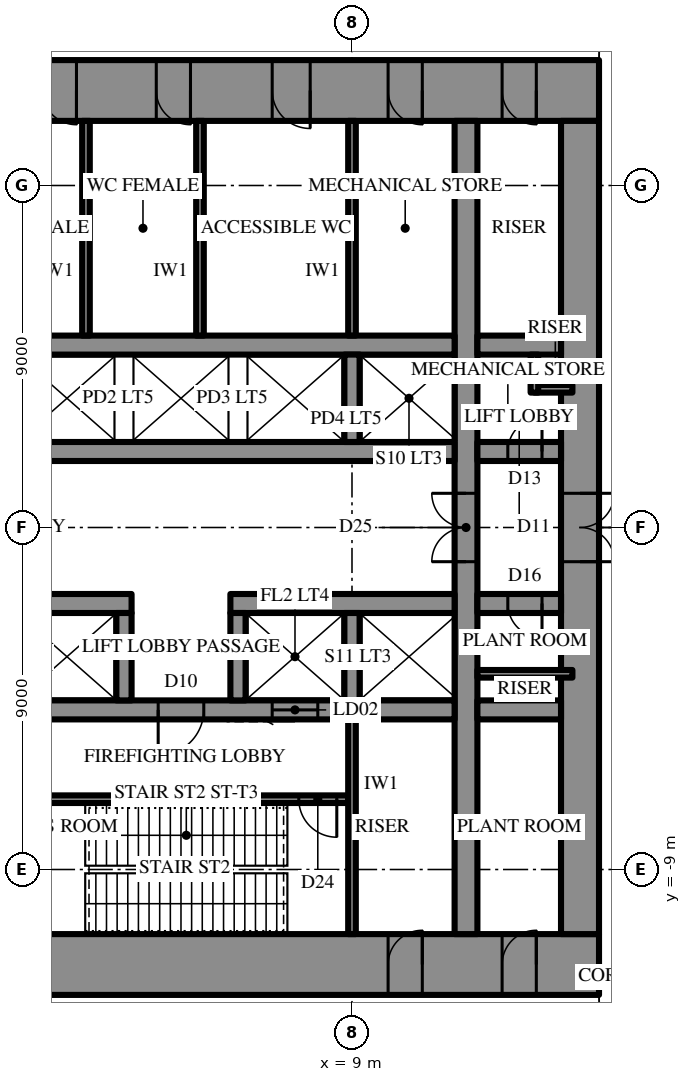
"""IFC4 building model, lengths in metres.
Left out: names, types, materials, properties, quantities, classifications, styles, units other than length and angle.
Written with IfcOpenShell. Run it as: python <this file> out.ifc"""

import sys

from ifc_helpers import new_model, si_unit, direction, frame, frame_2d, origin, place, context, subcontext, project, spatial, rectangle, extrude, element, fill, save


model = new_model("IFC4")
c1 = context("Model", 3, precision=1e-05, world=origin(), true_north=direction((0.0, 1.0)))
c2 = subcontext(c1, "Body", "Model", "MODEL_VIEW")
j1 = project(units=[si_unit("LENGTHUNIT", "METRE"), si_unit("PLANEANGLEUNIT", "RADIAN")], contexts=[c1])
p1 = place(None, origin())
s1 = spatial("IfcSite", under=j1, at=p1, CompositionType="ELEMENT")
p2 = place(p1, origin())
s2 = spatial("IfcBuilding", under=s1, at=p2, CompositionType="ELEMENT")
p3 = place(p2, frame((0.0, 0.0, 299.5)))
s3 = spatial("IfcBuildingStorey", under=s2, at=p3, CompositionType="ELEMENT", Elevation=299.5)
p4 = place(p3, frame((-15.5, 11.5, 0.0), z_axis=(0.0, 0.0, 1.0), x_axis=(1.0, 0.0, 0.0)))
e1 = element("IfcWall", 1, at=p4, inside=s3, PredefinedType="SHEAR", context=c2, shape_type="SweptSolid", body=[
    extrude(rectangle(XDim=31.0, YDim=1.6, at=frame_2d((15.5, 0.0))), origin(), (0.0, 0.0, 1.0), 7.0),
])
p5 = place(p4, frame((16.35, 0.0, 0.0)))
e2 = element("IfcOpeningElement", 2, at=p5, cuts=e1, PredefinedType="OPENING", context=c2, shape_type="SweptSolid", body=[
    extrude(rectangle(XDim=0.9, YDim=2.2, at=frame_2d((0.45, 1.1))), frame((0.0, 0.81, 0.0), z_axis=(0.0, -1.0, 0.0), x_axis=(1.0, 0.0, 0.0)), (0.0, 0.0, 1.0), 1.62),
])
p6 = place(p4, frame((19.35, 0.0, 0.0)))
e3 = element("IfcOpeningElement", 3, at=p6, cuts=e1, PredefinedType="OPENING", context=c2, shape_type="SweptSolid", body=[
    extrude(rectangle(XDim=0.9, YDim=2.2, at=frame_2d((0.45, 1.1))), frame((0.0, 0.81, 0.0), z_axis=(0.0, -1.0, 0.0), x_axis=(1.0, 0.0, 0.0)), (0.0, 0.0, 1.0), 1.62),
])
p7 = place(p4, frame((22.4, 0.0, 0.0)))
e4 = element("IfcOpeningElement", 4, at=p7, cuts=e1, PredefinedType="OPENING", context=c2, shape_type="SweptSolid", body=[
    extrude(rectangle(XDim=1.0, YDim=2.2, at=frame_2d((0.5, 1.1))), frame((0.0, 0.81, 0.0), z_axis=(0.0, -1.0, 0.0), x_axis=(1.0, 0.0, 0.0)), (0.0, 0.0, 1.0), 1.62),
])
p8 = place(p4, frame((1.65, 0.0, 0.0)))
e5 = element("IfcOpeningElement", 5, at=p8, cuts=e1, PredefinedType="OPENING", context=c2, shape_type="SweptSolid", body=[
    extrude(rectangle(XDim=0.9, YDim=2.2, at=frame_2d((0.45, 1.1))), frame((0.0, 0.81, 0.0), z_axis=(0.0, -1.0, 0.0), x_axis=(1.0, 0.0, 0.0)), (0.0, 0.0, 1.0), 1.62),
])
p9 = place(p4, frame((4.65, 0.0, 0.0)))
e6 = element("IfcOpeningElement", 6, at=p9, cuts=e1, PredefinedType="OPENING", context=c2, shape_type="SweptSolid", body=[
    extrude(rectangle(XDim=0.9, YDim=2.2, at=frame_2d((0.45, 1.1))), frame((0.0, 0.81, 0.0), z_axis=(0.0, -1.0, 0.0), x_axis=(1.0, 0.0, 0.0)), (0.0, 0.0, 1.0), 1.62),
])
p10 = place(p4, frame((25.45, 0.0, 0.0)))
e7 = element("IfcOpeningElement", 7, at=p10, cuts=e1, PredefinedType="OPENING", context=c2, shape_type="SweptSolid", body=[
    extrude(rectangle(XDim=0.9, YDim=2.2, at=frame_2d((0.45, 1.1))), frame((0.0, 0.81, 0.0), z_axis=(0.0, -1.0, 0.0), x_axis=(1.0, 0.0, 0.0)), (0.0, 0.0, 1.0), 1.62),
])
p11 = place(p4, frame((28.45, 0.0, 0.0)))
e8 = element("IfcOpeningElement", 8, at=p11, cuts=e1, PredefinedType="OPENING", context=c2, shape_type="SweptSolid", body=[
    extrude(rectangle(XDim=0.9, YDim=2.2, at=frame_2d((0.45, 1.1))), frame((0.0, 0.81, 0.0), z_axis=(0.0, -1.0, 0.0), x_axis=(1.0, 0.0, 0.0)), (0.0, 0.0, 1.0), 1.62),
])
p12 = place(p3, frame((15.5, -11.5, 0.0), z_axis=(0.0, 0.0, 1.0), x_axis=(-1.0, 0.0, 0.0)))
e9 = element("IfcWall", 9, at=p12, inside=s3, PredefinedType="SHEAR", context=c2, shape_type="SweptSolid", body=[
    extrude(rectangle(XDim=31.0, YDim=1.6, at=frame_2d((15.5, 0.0))), origin(), (0.0, 0.0, 1.0), 7.0),
])
p13 = place(p12, frame((16.35, 0.0, 0.0)))
e10 = element("IfcOpeningElement", 10, at=p13, cuts=e9, PredefinedType="OPENING", context=c2, shape_type="SweptSolid", body=[
    extrude(rectangle(XDim=0.9, YDim=2.2, at=frame_2d((0.45, 1.1))), frame((0.0, 0.81, 0.0), z_axis=(0.0, -1.0, 0.0), x_axis=(1.0, 0.0, 0.0)), (0.0, 0.0, 1.0), 1.62),
])
p14 = place(p12, frame((19.35, 0.0, 0.0)))
e11 = element("IfcOpeningElement", 11, at=p14, cuts=e9, PredefinedType="OPENING", context=c2, shape_type="SweptSolid", body=[
    extrude(rectangle(XDim=0.9, YDim=2.2, at=frame_2d((0.45, 1.1))), frame((0.0, 0.81, 0.0), z_axis=(0.0, -1.0, 0.0), x_axis=(1.0, 0.0, 0.0)), (0.0, 0.0, 1.0), 1.62),
])
p15 = place(p12, frame((22.4, 0.0, 0.0)))
e12 = element("IfcOpeningElement", 12, at=p15, cuts=e9, PredefinedType="OPENING", context=c2, shape_type="SweptSolid", body=[
    extrude(rectangle(XDim=1.0, YDim=2.2, at=frame_2d((0.5, 1.1))), frame((0.0, 0.81, 0.0), z_axis=(0.0, -1.0, 0.0), x_axis=(1.0, 0.0, 0.0)), (0.0, 0.0, 1.0), 1.62),
])
p16 = place(p12, frame((1.65, 0.0, 0.0)))
e13 = element("IfcOpeningElement", 13, at=p16, cuts=e9, PredefinedType="OPENING", context=c2, shape_type="SweptSolid", body=[
    extrude(rectangle(XDim=0.9, YDim=2.2, at=frame_2d((0.45, 1.1))), frame((0.0, 0.81, 0.0), z_axis=(0.0, -1.0, 0.0), x_axis=(1.0, 0.0, 0.0)), (0.0, 0.0, 1.0), 1.62),
])
p17 = place(p12, frame((4.65, 0.0, 0.0)))
e14 = element("IfcOpeningElement", 14, at=p17, cuts=e9, PredefinedType="OPENING", context=c2, shape_type="SweptSolid", body=[
    extrude(rectangle(XDim=0.9, YDim=2.2, at=frame_2d((0.45, 1.1))), frame((0.0, 0.81, 0.0), z_axis=(0.0, -1.0, 0.0), x_axis=(1.0, 0.0, 0.0)), (0.0, 0.0, 1.0), 1.62),
])
p18 = place(p12, frame((25.45, 0.0, 0.0)))
e15 = element("IfcOpeningElement", 15, at=p18, cuts=e9, PredefinedType="OPENING", context=c2, shape_type="SweptSolid", body=[
    extrude(rectangle(XDim=0.9, YDim=2.2, at=frame_2d((0.45, 1.1))), frame((0.0, 0.81, 0.0), z_axis=(0.0, -1.0, 0.0), x_axis=(1.0, 0.0, 0.0)), (0.0, 0.0, 1.0), 1.62),
])
p19 = place(p12, frame((28.45, 0.0, 0.0)))
e16 = element("IfcOpeningElement", 16, at=p19, cuts=e9, PredefinedType="OPENING", context=c2, shape_type="SweptSolid", body=[
    extrude(rectangle(XDim=0.9, YDim=2.2, at=frame_2d((0.45, 1.1))), frame((0.0, 0.81, 0.0), z_axis=(0.0, -1.0, 0.0), x_axis=(1.0, 0.0, 0.0)), (0.0, 0.0, 1.0), 1.62),
])
p20 = place(p3, frame((15.0, -10.7, 0.0), z_axis=(0.0, 0.0, 1.0), x_axis=(0.0, 1.0, 0.0)))
e17 = element("IfcWall", 17, at=p20, inside=s3, PredefinedType="SHEAR", context=c2, shape_type="SweptSolid", body=[
    extrude(rectangle(XDim=21.4, YDim=1.0, at=frame_2d((10.7, 0.0))), origin(), (0.0, 0.0, 1.0), 7.0),
])
p21 = place(p20, frame((9.8, 0.0, 0.0)))
e18 = element("IfcOpeningElement", 18, at=p21, cuts=e17, PredefinedType="OPENING", context=c2, shape_type="SweptSolid", body=[
    extrude(rectangle(XDim=1.8, YDim=2.4, at=frame_2d((0.9, 1.2))), frame((0.0, 0.51, 0.0), z_axis=(0.0, -1.0, 0.0), x_axis=(1.0, 0.0, 0.0)), (0.0, 0.0, 1.0), 1.02),
])
p22 = place(p3, frame((12.0, -10.7, 0.0), z_axis=(0.0, 0.0, 1.0), x_axis=(0.0, 1.0, 0.0)))
e19 = element("IfcWall", 19, at=p22, inside=s3, PredefinedType="SHEAR", context=c2, shape_type="SweptSolid", body=[
    extrude(rectangle(XDim=21.4, YDim=0.6, at=frame_2d((10.7, 0.0))), origin(), (0.0, 0.0, 1.0), 7.0),
])
p23 = place(p22, frame((9.8, 0.0, 0.0)))
e20 = element("IfcOpeningElement", 20, at=p23, cuts=e19, PredefinedType="OPENING", context=c2, shape_type="SweptSolid", body=[
    extrude(rectangle(XDim=1.8, YDim=2.4, at=frame_2d((0.9, 1.2))), frame((0.0, 0.31, 0.0), z_axis=(0.0, -1.0, 0.0), x_axis=(1.0, 0.0, 0.0)), (0.0, 0.0, 1.0), 0.62),
])
p24 = place(p3, frame((-3.2, 2.0, 0.0), z_axis=(0.0, 0.0, 1.0), x_axis=(1.0, 0.0, 0.0)))
e21 = element("IfcWall", 21, at=p24, inside=s3, PredefinedType="SHEAR", context=c2, shape_type="SweptSolid", body=[
    extrude(rectangle(XDim=14.9, YDim=0.5, at=frame_2d((7.45, 0.0))), origin(), (0.0, 0.0, 1.0), 7.0),
])
p25 = place(p3, frame((12.3, 2.0, 0.0), z_axis=(0.0, 0.0, 1.0), x_axis=(1.0, 0.0, 0.0)))
e22 = element("IfcWall", 22, at=p25, inside=s3, PredefinedType="SHEAR", context=c2, shape_type="SweptSolid", body=[
    extrude(rectangle(XDim=2.2, YDim=0.5, at=frame_2d((1.1, 0.0))), origin(), (0.0, 0.0, 1.0), 7.0),
])
p26 = place(p25, frame((0.8, 0.0, 0.0)))
e23 = element("IfcOpeningElement", 23, at=p26, cuts=e22, PredefinedType="OPENING", context=c2, shape_type="SweptSolid", body=[
    extrude(rectangle(XDim=0.9, YDim=2.2, at=frame_2d((0.45, 1.1))), frame((0.0, 0.26, 0.0), z_axis=(0.0, -1.0, 0.0), x_axis=(1.0, 0.0, 0.0)), (0.0, 0.0, 1.0), 0.52),
])
p27 = place(p3, frame((-11.7, 4.8, 0.0), z_axis=(0.0, 0.0, 1.0), x_axis=(1.0, 0.0, 0.0)))
e24 = element("IfcWall", 24, at=p27, inside=s3, PredefinedType="SHEAR", context=c2, shape_type="SweptSolid", body=[
    extrude(rectangle(XDim=23.4, YDim=0.5, at=frame_2d((11.7, 0.0))), origin(), (0.0, 0.0, 1.0), 7.0),
])
p28 = place(p27, frame((6.6, 0.0, 0.0)))
e25 = element("IfcOpeningElement", 25, at=p28, cuts=e24, PredefinedType="OPENING", context=c2, shape_type="SweptSolid", body=[
    extrude(rectangle(XDim=1.2, YDim=2.2, at=frame_2d((0.6, 1.1))), frame((0.0, 0.26, 0.0), z_axis=(0.0, -1.0, 0.0), x_axis=(1.0, 0.0, 0.0)), (0.0, 0.0, 1.0), 0.52),
])
p29 = place(p27, frame((3.6, 0.0, 0.0)))
e26 = element("IfcOpeningElement", 26, at=p29, cuts=e24, PredefinedType="OPENING", context=c2, shape_type="SweptSolid", body=[
    extrude(rectangle(XDim=1.2, YDim=2.2, at=frame_2d((0.6, 1.1))), frame((0.0, 0.26, 0.0), z_axis=(0.0, -1.0, 0.0), x_axis=(1.0, 0.0, 0.0)), (0.0, 0.0, 1.0), 0.52),
])
p30 = place(p3, frame((12.3, 4.8, 0.0), z_axis=(0.0, 0.0, 1.0), x_axis=(1.0, 0.0, 0.0)))
e27 = element("IfcWall", 27, at=p30, inside=s3, PredefinedType="SHEAR", context=c2, shape_type="SweptSolid", body=[
    extrude(rectangle(XDim=2.2, YDim=0.5, at=frame_2d((1.1, 0.0))), origin(), (0.0, 0.0, 1.0), 7.0),
])
p31 = place(p3, frame((9.0, 2.25, 0.0), z_axis=(0.0, 0.0, 1.0), x_axis=(0.0, 1.0, 0.0)))
e28 = element("IfcWall", 28, at=p31, inside=s3, PredefinedType="SHEAR", context=c2, shape_type="SweptSolid", body=[
    extrude(rectangle(XDim=2.3, YDim=0.4, at=frame_2d((1.15, 0.0))), origin(), (0.0, 0.0, 1.0), 7.0),
])
p32 = place(p3, frame((14.5, -2.0, 0.0), z_axis=(0.0, 0.0, 1.0), x_axis=(-1.0, 0.0, 0.0)))
e29 = element("IfcWall", 29, at=p32, inside=s3, PredefinedType="SHEAR", context=c2, shape_type="SweptSolid", body=[
    extrude(rectangle(XDim=2.2, YDim=0.5, at=frame_2d((1.1, 0.0))), origin(), (0.0, 0.0, 1.0), 7.0),
])
p33 = place(p32, frame((0.5, 0.0, 0.0)))
e30 = element("IfcOpeningElement", 30, at=p33, cuts=e29, PredefinedType="OPENING", context=c2, shape_type="SweptSolid", body=[
    extrude(rectangle(XDim=0.9, YDim=2.2, at=frame_2d((0.45, 1.1))), frame((0.0, 0.26, 0.0), z_axis=(0.0, -1.0, 0.0), x_axis=(1.0, 0.0, 0.0)), (0.0, 0.0, 1.0), 0.52),
])
p34 = place(p3, frame((11.7, -2.0, 0.0), z_axis=(0.0, 0.0, 1.0), x_axis=(-1.0, 0.0, 0.0)))
e31 = element("IfcWall", 31, at=p34, inside=s3, PredefinedType="SHEAR", context=c2, shape_type="SweptSolid", body=[
    extrude(rectangle(XDim=5.9, YDim=0.5, at=frame_2d((2.95, 0.0))), origin(), (0.0, 0.0, 1.0), 7.0),
])
p35 = place(p3, frame((3.2, -2.0, 0.0), z_axis=(0.0, 0.0, 1.0), x_axis=(-1.0, 0.0, 0.0)))
e32 = element("IfcWall", 32, at=p35, inside=s3, PredefinedType="SHEAR", context=c2, shape_type="SweptSolid", body=[
    extrude(rectangle(XDim=14.9, YDim=0.5, at=frame_2d((7.45, 0.0))), origin(), (0.0, 0.0, 1.0), 7.0),
])
p36 = place(p3, frame((14.5, -4.8, 0.0), z_axis=(0.0, 0.0, 1.0), x_axis=(-1.0, 0.0, 0.0)))
e33 = element("IfcWall", 33, at=p36, inside=s3, PredefinedType="SHEAR", context=c2, shape_type="SweptSolid", body=[
    extrude(rectangle(XDim=2.2, YDim=0.5, at=frame_2d((1.1, 0.0))), origin(), (0.0, 0.0, 1.0), 7.0),
])
p37 = place(p3, frame((11.7, -4.8, 0.0), z_axis=(0.0, 0.0, 1.0), x_axis=(-1.0, 0.0, 0.0)))
e34 = element("IfcWall", 34, at=p37, inside=s3, PredefinedType="SHEAR", context=c2, shape_type="SweptSolid", body=[
    extrude(rectangle(XDim=23.4, YDim=0.5, at=frame_2d((11.7, 0.0))), origin(), (0.0, 0.0, 1.0), 7.0),
])
p38 = place(p37, frame((6.6, 0.0, 0.0)))
e35 = element("IfcOpeningElement", 35, at=p38, cuts=e34, PredefinedType="OPENING", context=c2, shape_type="SweptSolid", body=[
    extrude(rectangle(XDim=1.2, YDim=2.2, at=frame_2d((0.6, 1.1))), frame((0.0, 0.26, 0.0), z_axis=(0.0, -1.0, 0.0), x_axis=(1.0, 0.0, 0.0)), (0.0, 0.0, 1.0), 0.52),
])
p39 = place(p37, frame((3.6, 0.0, 0.0)))
e36 = element("IfcOpeningElement", 36, at=p39, cuts=e34, PredefinedType="OPENING", context=c2, shape_type="SweptSolid", body=[
    extrude(rectangle(XDim=1.2, YDim=2.2, at=frame_2d((0.6, 1.1))), frame((0.0, 0.26, 0.0), z_axis=(0.0, -1.0, 0.0), x_axis=(1.0, 0.0, 0.0)), (0.0, 0.0, 1.0), 0.52),
])
for number, where, z_axis, x_axis in (
    (37, (9.0, -2.25, 0.0), (0.0, 0.0, 1.0), (0.0, -1.0, 0.0)),
    (38, (6.0, -2.25, 0.0), (0.0, 0.0, 1.0), (0.0, -1.0, 0.0)),
    (39, (3.0, -2.25, 0.0), (0.0, 0.0, 1.0), (0.0, -1.0, 0.0)),
):
    element("IfcWall", number, at=place(p3, frame(where, z_axis=z_axis, x_axis=x_axis)), inside=s3, PredefinedType="SHEAR", context=c2, shape_type="SweptSolid", body=[
        extrude(rectangle(XDim=2.3, YDim=0.4, at=frame_2d((1.15, 0.0))), origin(), (0.0, 0.0, 1.0), 7.0),
    ])
p40 = place(p3, frame((8.9, -7.15, 0.0), z_axis=(0.0, 0.0, 1.0), x_axis=(-1.0, 0.0, 0.0)))
e40 = element("IfcWall", 40, at=p40, inside=s3, PredefinedType="SHEAR", context=c2, shape_type="SweptSolid", body=[
    extrude(rectangle(XDim=8.6, YDim=0.2, at=frame_2d((4.3, 0.0))), origin(), (0.0, 0.0, 1.0), 7.0),
])
p41 = place(p40, frame((0.3, 0.0, 0.0)))
e41 = element("IfcOpeningElement", 41, at=p41, cuts=e40, PredefinedType="OPENING", context=c2, shape_type="SweptSolid", body=[
    extrude(rectangle(XDim=1.0, YDim=2.2, at=frame_2d((0.5, 1.1))), frame((0.0, 0.11, 0.0), z_axis=(0.0, -1.0, 0.0), x_axis=(1.0, 0.0, 0.0)), (0.0, 0.0, 1.0), 0.22),
])
for number, where, z_axis, x_axis in (
    (42, (9.0, 5.05, 0.0), (0.0, 0.0, 1.0), (0.0, 1.0, 0.0)),
    (43, (2.0, 5.05, 0.0), (0.0, 0.0, 1.0), (0.0, 1.0, 0.0)),
    (44, (5.0, 5.05, 0.0), (0.0, 0.0, 1.0), (0.0, 1.0, 0.0)),
    (45, (9.0, -5.05, 0.0), (0.0, 0.0, 1.0), (0.0, -1.0, 0.0)),
):
    element("IfcWall", number, at=place(p3, frame(where, z_axis=z_axis, x_axis=x_axis)), inside=s3, PredefinedType="PARTITIONING", context=c2, shape_type="SweptSolid", body=[
        extrude(rectangle(XDim=5.65, YDim=0.2, at=frame_2d((2.825, 0.0))), origin(), (0.0, 0.0, 1.0), 6.7),
    ])
for number, where, z_axis, x_axis in (
    (46, (13.8, 3.65, 0.0), (0.0, 0.0, 1.0), (1.0, 0.0, 0.0)),
    (47, (13.8, 3.55, 0.0), (0.0, 0.0, 1.0), (0.0, 1.0, 0.0)),
):
    element("IfcWall", number, at=place(p3, frame(where, z_axis=z_axis, x_axis=x_axis)), inside=s3, PredefinedType="PARTITIONING", context=c2, shape_type="SweptSolid", body=[
        extrude(rectangle(XDim=1.0, YDim=0.2, at=frame_2d((0.5, 0.0))), origin(), (0.0, 0.0, 1.0), 6.7),
    ])
p42 = place(p3, frame((14.8, -3.85, 0.0), z_axis=(0.0, 0.0, 1.0), x_axis=(-1.0, 0.0, 0.0)))
e48 = element("IfcWall", 48, at=p42, inside=s3, PredefinedType="PARTITIONING", context=c2, shape_type="SweptSolid", body=[
    extrude(rectangle(XDim=2.5, YDim=0.2, at=frame_2d((1.25, 0.0))), origin(), (0.0, 0.0, 1.0), 6.7),
])
p43 = place(p21, frame((1.8, 0.0, 0.0), z_axis=(0.0, 0.0, 1.0), x_axis=(-1.0, 0.0, 0.0)))
e49 = element("IfcDoor", 49, at=p43, inside=s3, OperationType="DOUBLE_DOOR_SINGLE_SWING", PredefinedType="DOOR", context=c2, shape_type="SweptSolid", body=[
    extrude(rectangle(XDim=1.8, YDim=2.4, at=frame_2d((0.9, 1.2))), frame((0.0, 0.025, 0.0), z_axis=(0.0, -1.0, 0.0), x_axis=(1.0, 0.0, 0.0)), (0.0, 0.0, 1.0), 0.05),
])
fill(e18, e49)
p44 = place(p5, frame((0.9, 0.0, 0.0), z_axis=(0.0, 0.0, 1.0), x_axis=(-1.0, 0.0, 0.0)))
e50 = element("IfcDoor", 50, at=p44, inside=s3, OperationType="SINGLE_SWING_RIGHT", PredefinedType="DOOR", context=c2, shape_type="SweptSolid", body=[
    extrude(rectangle(XDim=0.9, YDim=2.2, at=frame_2d((0.45, 1.1))), frame((0.0, 0.025, 0.0), z_axis=(0.0, -1.0, 0.0), x_axis=(1.0, 0.0, 0.0)), (0.0, 0.0, 1.0), 0.05),
])
fill(e2, e50)
p45 = place(p6, frame((0.9, 0.0, 0.0), z_axis=(0.0, 0.0, 1.0), x_axis=(-1.0, 0.0, 0.0)))
e51 = element("IfcDoor", 51, at=p45, inside=s3, OperationType="SINGLE_SWING_RIGHT", PredefinedType="DOOR", context=c2, shape_type="SweptSolid", body=[
    extrude(rectangle(XDim=0.9, YDim=2.2, at=frame_2d((0.45, 1.1))), frame((0.0, 0.025, 0.0), z_axis=(0.0, -1.0, 0.0), x_axis=(1.0, 0.0, 0.0)), (0.0, 0.0, 1.0), 0.05),
])
fill(e3, e51)
p46 = place(p7, frame((1.0, 0.0, 0.0), z_axis=(0.0, 0.0, 1.0), x_axis=(-1.0, 0.0, 0.0)))
e52 = element("IfcDoor", 52, at=p46, inside=s3, OperationType="SINGLE_SWING_RIGHT", PredefinedType="DOOR", context=c2, shape_type="SweptSolid", body=[
    extrude(rectangle(XDim=1.0, YDim=2.2, at=frame_2d((0.5, 1.1))), frame((0.0, 0.025, 0.0), z_axis=(0.0, -1.0, 0.0), x_axis=(1.0, 0.0, 0.0)), (0.0, 0.0, 1.0), 0.05),
])
fill(e4, e52)
p47 = place(p10, frame((0.9, 0.0, 0.0), z_axis=(0.0, 0.0, 1.0), x_axis=(-1.0, 0.0, 0.0)))
e53 = element("IfcDoor", 53, at=p47, inside=s3, OperationType="SINGLE_SWING_RIGHT", PredefinedType="DOOR", context=c2, shape_type="SweptSolid", body=[
    extrude(rectangle(XDim=0.9, YDim=2.2, at=frame_2d((0.45, 1.1))), frame((0.0, 0.025, 0.0), z_axis=(0.0, -1.0, 0.0), x_axis=(1.0, 0.0, 0.0)), (0.0, 0.0, 1.0), 0.05),
])
fill(e7, e53)
p48 = place(p11, frame((0.9, 0.0, 0.0), z_axis=(0.0, 0.0, 1.0), x_axis=(-1.0, 0.0, 0.0)))
e54 = element("IfcDoor", 54, at=p48, inside=s3, OperationType="SINGLE_SWING_RIGHT", PredefinedType="DOOR", context=c2, shape_type="SweptSolid", body=[
    extrude(rectangle(XDim=0.9, YDim=2.2, at=frame_2d((0.45, 1.1))), frame((0.0, 0.025, 0.0), z_axis=(0.0, -1.0, 0.0), x_axis=(1.0, 0.0, 0.0)), (0.0, 0.0, 1.0), 0.05),
])
fill(e8, e54)
p49 = place(p38, origin())
e55 = element("IfcDoor", 55, at=p49, inside=s3, OperationType="SINGLE_SWING_LEFT", PredefinedType="DOOR", context=c2, shape_type="SweptSolid", body=[
    extrude(rectangle(XDim=1.2, YDim=2.2, at=frame_2d((0.6, 1.1))), frame((0.0, 0.025, 0.0), z_axis=(0.0, -1.0, 0.0), x_axis=(1.0, 0.0, 0.0)), (0.0, 0.0, 1.0), 0.05),
])
fill(e35, e55)
p50 = place(p41, origin())
e56 = element("IfcDoor", 56, at=p50, inside=s3, OperationType="SINGLE_SWING_RIGHT", PredefinedType="DOOR", context=c2, shape_type="SweptSolid", body=[
    extrude(rectangle(XDim=1.0, YDim=2.2, at=frame_2d((0.5, 1.1))), frame((0.0, 0.025, 0.0), z_axis=(0.0, -1.0, 0.0), x_axis=(1.0, 0.0, 0.0)), (0.0, 0.0, 1.0), 0.05),
])
fill(e41, e56)
p51 = place(p16, frame((0.9, 0.0, 0.0), z_axis=(0.0, 0.0, 1.0), x_axis=(-1.0, 0.0, 0.0)))
e57 = element("IfcDoor", 57, at=p51, inside=s3, OperationType="SINGLE_SWING_LEFT", PredefinedType="DOOR", context=c2, shape_type="SweptSolid", body=[
    extrude(rectangle(XDim=0.9, YDim=2.2, at=frame_2d((0.45, 1.1))), frame((0.0, 0.025, 0.0), z_axis=(0.0, -1.0, 0.0), x_axis=(1.0, 0.0, 0.0)), (0.0, 0.0, 1.0), 0.05),
])
fill(e13, e57)
p52 = place(p17, frame((0.9, 0.0, 0.0), z_axis=(0.0, 0.0, 1.0), x_axis=(-1.0, 0.0, 0.0)))
e58 = element("IfcDoor", 58, at=p52, inside=s3, OperationType="SINGLE_SWING_LEFT", PredefinedType="DOOR", context=c2, shape_type="SweptSolid", body=[
    extrude(rectangle(XDim=0.9, YDim=2.2, at=frame_2d((0.45, 1.1))), frame((0.0, 0.025, 0.0), z_axis=(0.0, -1.0, 0.0), x_axis=(1.0, 0.0, 0.0)), (0.0, 0.0, 1.0), 0.05),
])
fill(e14, e58)
p53 = place(p26, origin())
e59 = element("IfcDoor", 59, at=p53, inside=s3, OperationType="SINGLE_SWING_LEFT", PredefinedType="DOOR", context=c2, shape_type="SweptSolid", body=[
    extrude(rectangle(XDim=0.9, YDim=2.2, at=frame_2d((0.45, 1.1))), frame((0.0, 0.025, 0.0), z_axis=(0.0, -1.0, 0.0), x_axis=(1.0, 0.0, 0.0)), (0.0, 0.0, 1.0), 0.05),
])
fill(e23, e59)
p54 = place(p33, origin())
e60 = element("IfcDoor", 60, at=p54, inside=s3, OperationType="SINGLE_SWING_RIGHT", PredefinedType="DOOR", context=c2, shape_type="SweptSolid", body=[
    extrude(rectangle(XDim=0.9, YDim=2.2, at=frame_2d((0.45, 1.1))), frame((0.0, 0.025, 0.0), z_axis=(0.0, -1.0, 0.0), x_axis=(1.0, 0.0, 0.0)), (0.0, 0.0, 1.0), 0.05),
])
fill(e30, e60)
p55 = place(p23, origin())
e61 = element("IfcDoor", 61, at=p55, inside=s3, OperationType="DOUBLE_DOOR_SINGLE_SWING", PredefinedType="DOOR", context=c2, shape_type="SweptSolid", body=[
    extrude(rectangle(XDim=1.8, YDim=2.4, at=frame_2d((0.9, 1.2))), frame((0.0, 0.025, 0.0), z_axis=(0.0, -1.0, 0.0), x_axis=(1.0, 0.0, 0.0)), (0.0, 0.0, 1.0), 0.05),
])
fill(e20, e61)
p56 = place(p39, origin())
e62 = element("IfcDoor", 62, at=p56, inside=s3, OperationType="SLIDING_TO_LEFT", PredefinedType="DOOR", context=c2, shape_type="SweptSolid", body=[
    extrude(rectangle(XDim=1.2, YDim=2.2, at=frame_2d((0.6, 1.1))), frame((0.0, 0.025, 0.0), z_axis=(0.0, -1.0, 0.0), x_axis=(1.0, 0.0, 0.0)), (0.0, 0.0, 1.0), 0.05),
])
fill(e36, e62)
save(model, sys.argv[1])
